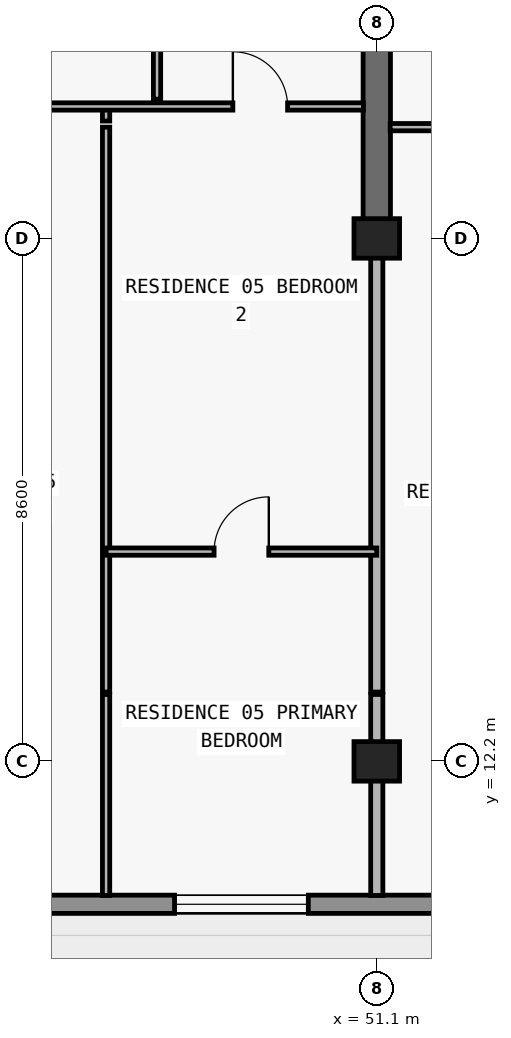
"""IFC4 building model, lengths in metres.
Left out: names, types, materials, properties, quantities, classifications, styles, units other than length and angle.
Written with IfcOpenShell. Run it as: python <this file> out.ifc"""

import sys

from ifc_helpers import new_model, si_unit, direction, frame, frame_2d, origin, origin_2d, place, context, subcontext, project, spatial, rectangle, extrude, element, fill, save


model = new_model("IFC4")
c1 = context("Model", 3, precision=1e-05, world=origin(), true_north=direction((0.0, 1.0)))
c2 = subcontext(c1, "Body", "Model", "MODEL_VIEW")
j1 = project(units=[si_unit("LENGTHUNIT", "METRE"), si_unit("PLANEANGLEUNIT", "RADIAN")], contexts=[c1])
p1 = place(None, origin())
s1 = spatial("IfcSite", under=j1, at=p1, CompositionType="ELEMENT")
p2 = place(p1, origin())
s2 = spatial("IfcBuilding", under=s1, at=p2, CompositionType="ELEMENT")
p3 = place(p2, frame((0.0, 0.0, 226.5)))
s3 = spatial("IfcBuildingStorey", under=s2, at=p3, CompositionType="ELEMENT", Elevation=226.5)
for number, where, z_axis, x_axis in (
    (1, (51.1, 12.2, 0.0), (0.0, 0.0, 1.0), (1.0, 0.0, 0.0)),
    (2, (51.1, 20.8, 0.0), (0.0, 0.0, 1.0), (1.0, 0.0, 0.0)),
):
    element("IfcColumn", number, at=place(p3, frame(where, z_axis=z_axis, x_axis=x_axis)), inside=s3, PredefinedType="COLUMN", context=c2, shape_type="SweptSolid", body=[
        extrude(rectangle(XDim=0.75, YDim=0.65, at=origin_2d()), origin(), (0.0, 0.0, 1.0), 3.05),
    ])
p4 = place(p3, frame((51.1, 20.8, 0.0), z_axis=(0.0, 0.0, 1.0), x_axis=(0.0, 1.0, 0.0)))
e3 = element("IfcWall", 3, at=p4, inside=s3, PredefinedType="SHEAR", context=c2, shape_type="SweptSolid", body=[
    extrude(rectangle(XDim=8.6, YDim=0.45, at=frame_2d((4.3, 0.0))), origin(), (0.0, 0.0, 1.0), 3.05),
])
p5 = place(p3, frame((65.7, 9.85, 0.0), z_axis=(0.0, 0.0, 1.0), x_axis=(-1.0, 0.0, 0.0)))
e4 = element("IfcWall", 4, at=p5, inside=s3, PredefinedType="STANDARD", context=c2, shape_type="SweptSolid", body=[
    extrude(rectangle(XDim=53.6, YDim=0.3, at=frame_2d((26.8, 0.0))), origin(), (0.0, 0.0, 1.0), 3.05),
])
p6 = place(p5, frame((48.05, 0.0, 0.85)))
e5 = element("IfcOpeningElement", 5, at=p6, cuts=e4, PredefinedType="OPENING", context=c2, shape_type="SweptSolid", body=[
    extrude(rectangle(XDim=1.8, YDim=1.55, at=frame_2d((0.9, 0.775))), frame((0.0, 0.16, 0.0), z_axis=(0.0, -1.0, 0.0), x_axis=(1.0, 0.0, 0.0)), (0.0, 0.0, 1.0), 0.32),
])
p7 = place(p5, frame((44.09, 0.0, 0.0)))
e6 = element("IfcOpeningElement", 6, at=p7, cuts=e4, PredefinedType="OPENING", context=c2, shape_type="SweptSolid", body=[
    extrude(rectangle(XDim=2.0, YDim=2.3, at=frame_2d((1.0, 1.15))), frame((0.0, 0.16, 0.0), z_axis=(0.0, -1.0, 0.0), x_axis=(1.0, 0.0, 0.0)), (0.0, 0.0, 1.0), 0.32),
])
p8 = place(p5, frame((39.99, 0.0, 0.85)))
e7 = element("IfcOpeningElement", 7, at=p8, cuts=e4, PredefinedType="OPENING", context=c2, shape_type="SweptSolid", body=[
    extrude(rectangle(XDim=1.8, YDim=1.55, at=frame_2d((0.9, 0.775))), frame((0.0, 0.16, 0.0), z_axis=(0.0, -1.0, 0.0), x_axis=(1.0, 0.0, 0.0)), (0.0, 0.0, 1.0), 0.32),
])
p9 = place(p5, frame((36.026, 0.0, 0.0)))
e8 = element("IfcOpeningElement", 8, at=p9, cuts=e4, PredefinedType="OPENING", context=c2, shape_type="SweptSolid", body=[
    extrude(rectangle(XDim=2.0, YDim=2.3, at=frame_2d((1.0, 1.15))), frame((0.0, 0.16, 0.0), z_axis=(0.0, -1.0, 0.0), x_axis=(1.0, 0.0, 0.0)), (0.0, 0.0, 1.0), 0.32),
])
p10 = place(p5, frame((31.726, 0.0, 0.85)))
e9 = element("IfcOpeningElement", 9, at=p10, cuts=e4, PredefinedType="OPENING", context=c2, shape_type="SweptSolid", body=[
    extrude(rectangle(XDim=2.2, YDim=1.55, at=frame_2d((1.1, 0.775))), frame((0.0, 0.16, 0.0), z_axis=(0.0, -1.0, 0.0), x_axis=(1.0, 0.0, 0.0)), (0.0, 0.0, 1.0), 0.32),
])
p11 = place(p5, frame((27.51, 0.0, 0.0)))
e10 = element("IfcOpeningElement", 10, at=p11, cuts=e4, PredefinedType="OPENING", context=c2, shape_type="SweptSolid", body=[
    extrude(rectangle(XDim=2.0, YDim=2.3, at=frame_2d((1.0, 1.15))), frame((0.0, 0.16, 0.0), z_axis=(0.0, -1.0, 0.0), x_axis=(1.0, 0.0, 0.0)), (0.0, 0.0, 1.0), 0.32),
])
p12 = place(p5, frame((23.81, 0.0, 0.85)))
e11 = element("IfcOpeningElement", 11, at=p12, cuts=e4, PredefinedType="OPENING", context=c2, shape_type="SweptSolid", body=[
    extrude(rectangle(XDim=1.8, YDim=1.55, at=frame_2d((0.9, 0.775))), frame((0.0, 0.16, 0.0), z_axis=(0.0, -1.0, 0.0), x_axis=(1.0, 0.0, 0.0)), (0.0, 0.0, 1.0), 0.32),
])
p13 = place(p5, frame((20.026, 0.0, 0.0)))
e12 = element("IfcOpeningElement", 12, at=p13, cuts=e4, PredefinedType="OPENING", context=c2, shape_type="SweptSolid", body=[
    extrude(rectangle(XDim=2.0, YDim=2.3, at=frame_2d((1.0, 1.15))), frame((0.0, 0.16, 0.0), z_axis=(0.0, -1.0, 0.0), x_axis=(1.0, 0.0, 0.0)), (0.0, 0.0, 1.0), 0.32),
])
p14 = place(p5, frame((15.726, 0.0, 0.85)))
e13 = element("IfcOpeningElement", 13, at=p14, cuts=e4, PredefinedType="OPENING", context=c2, shape_type="SweptSolid", body=[
    extrude(rectangle(XDim=2.2, YDim=1.55, at=frame_2d((1.1, 0.775))), frame((0.0, 0.16, 0.0), z_axis=(0.0, -1.0, 0.0), x_axis=(1.0, 0.0, 0.0)), (0.0, 0.0, 1.0), 0.32),
])
p15 = place(p5, frame((11.29, 0.0, 0.0)))
e14 = element("IfcOpeningElement", 14, at=p15, cuts=e4, PredefinedType="OPENING", context=c2, shape_type="SweptSolid", body=[
    extrude(rectangle(XDim=2.0, YDim=2.3, at=frame_2d((1.0, 1.15))), frame((0.0, 0.16, 0.0), z_axis=(0.0, -1.0, 0.0), x_axis=(1.0, 0.0, 0.0)), (0.0, 0.0, 1.0), 0.32),
])
p16 = place(p5, frame((7.19, 0.0, 0.85)))
e15 = element("IfcOpeningElement", 15, at=p16, cuts=e4, PredefinedType="OPENING", context=c2, shape_type="SweptSolid", body=[
    extrude(rectangle(XDim=1.8, YDim=1.55, at=frame_2d((0.9, 0.775))), frame((0.0, 0.16, 0.0), z_axis=(0.0, -1.0, 0.0), x_axis=(1.0, 0.0, 0.0)), (0.0, 0.0, 1.0), 0.32),
])
p17 = place(p5, frame((0.65, 0.0, 0.85)))
e16 = element("IfcOpeningElement", 16, at=p17, cuts=e4, PredefinedType="OPENING", context=c2, shape_type="SweptSolid", body=[
    extrude(rectangle(XDim=1.8, YDim=1.55, at=frame_2d((0.9, 0.775))), frame((0.0, 0.16, 0.0), z_axis=(0.0, -1.0, 0.0), x_axis=(1.0, 0.0, 0.0)), (0.0, 0.0, 1.0), 0.32),
])
p18 = place(p3, frame((46.648, 9.995, 0.0), z_axis=(0.0, 0.0, 1.0), x_axis=(0.0, 1.0, 0.0)))
e17 = element("IfcWall", 17, at=p18, inside=s3, PredefinedType="PARTITIONING", context=c2, shape_type="SweptSolid", body=[
    extrude(rectangle(XDim=3.305, YDim=0.12, at=frame_2d((1.652, 0.0))), origin(), (0.0, 0.0, 1.0), 3.05),
])
p19 = place(p3, frame((46.648, 13.34, 0.0), z_axis=(0.0, 0.0, 1.0), x_axis=(0.0, 1.0, 0.0)))
e18 = element("IfcWall", 18, at=p19, inside=s3, PredefinedType="PARTITIONING", context=c2, shape_type="SweptSolid", body=[
    extrude(rectangle(XDim=9.29, YDim=0.12, at=frame_2d((4.645, 0.0))), origin(), (0.0, 0.0, 1.0), 3.05),
])
p20 = place(p3, frame((46.648, 22.73, 0.0), z_axis=(0.0, 0.0, 1.0), x_axis=(0.0, 1.0, 0.0)))
e19 = element("IfcWall", 19, at=p20, inside=s3, PredefinedType="PARTITIONING", context=c2, shape_type="SweptSolid", body=[
    extrude(rectangle(XDim=0.24, YDim=0.12, at=frame_2d((0.12, 0.0))), origin(), (0.0, 0.0, 1.0), 3.05),
])
p21 = place(p3, frame((47.486, 23.09, 0.0), z_axis=(0.0, 0.0, 1.0), x_axis=(0.0, 1.0, 0.0)))
e20 = element("IfcWall", 20, at=p21, inside=s3, PredefinedType="PARTITIONING", context=c2, shape_type="SweptSolid", body=[
    extrude(rectangle(XDim=4.69, YDim=0.12, at=frame_2d((2.345, 0.0))), origin(), (0.0, 0.0, 1.0), 3.05),
])
p22 = place(p21, frame((1.895, 0.0, 0.0)))
e21 = element("IfcOpeningElement", 21, at=p22, cuts=e20, PredefinedType="OPENING", context=c2, shape_type="SweptSolid", body=[
    extrude(rectangle(XDim=0.9, YDim=2.15, at=frame_2d((0.45, 1.075))), frame((0.0, 0.07, 0.0), z_axis=(0.0, -1.0, 0.0), x_axis=(1.0, 0.0, 0.0)), (0.0, 0.0, 1.0), 0.14),
])
p23 = place(p3, frame((51.1, 9.995, 0.0), z_axis=(0.0, 0.0, 1.0), x_axis=(0.0, 1.0, 0.0)))
e22 = element("IfcWall", 22, at=p23, inside=s3, PredefinedType="PARTITIONING", context=c2, shape_type="SweptSolid", body=[
    extrude(rectangle(XDim=3.305, YDim=0.2, at=frame_2d((1.652, 0.0))), origin(), (0.0, 0.0, 1.0), 2.263),
])
p24 = place(p3, frame((51.1, 13.34, 0.0), z_axis=(0.0, 0.0, 1.0), x_axis=(0.0, 1.0, 0.0)))
e23 = element("IfcWall", 23, at=p24, inside=s3, PredefinedType="PARTITIONING", context=c2, shape_type="SweptSolid", body=[
    extrude(rectangle(XDim=7.455, YDim=0.2, at=frame_2d((3.728, 0.0))), origin(), (0.0, 0.0, 1.0), 2.263),
])
p25 = place(p3, frame((46.648, 15.65, 0.0), z_axis=(0.0, 0.0, 1.0), x_axis=(1.0, 0.0, 0.0)))
e24 = element("IfcWall", 24, at=p25, inside=s3, PredefinedType="PARTITIONING", context=c2, shape_type="SweptSolid", body=[
    extrude(rectangle(XDim=4.452, YDim=0.12, at=frame_2d((2.226, 0.0))), origin(), (0.0, 0.0, 1.0), 3.05),
])
p26 = place(p25, frame((1.776, 0.0, 0.0)))
e25 = element("IfcOpeningElement", 25, at=p26, cuts=e24, PredefinedType="OPENING", context=c2, shape_type="SweptSolid", body=[
    extrude(rectangle(XDim=0.9, YDim=2.15, at=frame_2d((0.45, 1.075))), frame((0.0, 0.07, 0.0), z_axis=(0.0, -1.0, 0.0), x_axis=(1.0, 0.0, 0.0)), (0.0, 0.0, 1.0), 0.14),
])
p27 = place(p3, frame((51.32, 22.63, 0.0), z_axis=(0.0, 0.0, 1.0), x_axis=(1.0, 0.0, 0.0)))
e26 = element("IfcWall", 26, at=p27, inside=s3, PredefinedType="PARTITIONING", context=c2, shape_type="SweptSolid", body=[
    extrude(rectangle(XDim=8.18, YDim=0.12, at=frame_2d((4.09, 0.0))), origin(), (0.0, 0.0, 1.0), 3.05),
])
p28 = place(p27, frame((1.583, 0.0, 0.0)))
e27 = element("IfcOpeningElement", 27, at=p28, cuts=e26, PredefinedType="OPENING", context=c2, shape_type="SweptSolid", body=[
    extrude(rectangle(XDim=0.9, YDim=2.15, at=frame_2d((0.45, 1.075))), frame((0.0, 0.07, 0.0), z_axis=(0.0, -1.0, 0.0), x_axis=(1.0, 0.0, 0.0)), (0.0, 0.0, 1.0), 0.14),
])
p29 = place(p27, frame((5.84, 0.0, 0.0)))
e28 = element("IfcOpeningElement", 28, at=p29, cuts=e26, PredefinedType="OPENING", context=c2, shape_type="SweptSolid", body=[
    extrude(rectangle(XDim=0.9, YDim=2.15, at=frame_2d((0.45, 1.075))), frame((0.0, 0.07, 0.0), z_axis=(0.0, -1.0, 0.0), x_axis=(1.0, 0.0, 0.0)), (0.0, 0.0, 1.0), 0.14),
])
p30 = place(p3, frame((42.7, 22.97, 0.0), z_axis=(0.0, 0.0, 1.0), x_axis=(1.0, 0.0, 0.0)))
e29 = element("IfcWall", 29, at=p30, inside=s3, PredefinedType="PARTITIONING", context=c2, shape_type="SweptSolid", body=[
    extrude(rectangle(XDim=8.18, YDim=0.12, at=frame_2d((4.09, 0.0))), origin(), (0.0, 0.0, 1.0), 3.05),
])
p31 = place(p30, frame((1.524, 0.0, 0.0)))
e30 = element("IfcOpeningElement", 30, at=p31, cuts=e29, PredefinedType="OPENING", context=c2, shape_type="SweptSolid", body=[
    extrude(rectangle(XDim=0.9, YDim=2.15, at=frame_2d((0.45, 1.075))), frame((0.0, 0.07, 0.0), z_axis=(0.0, -1.0, 0.0), x_axis=(1.0, 0.0, 0.0)), (0.0, 0.0, 1.0), 0.14),
])
p32 = place(p30, frame((6.033, 0.0, 0.0)))
e31 = element("IfcOpeningElement", 31, at=p32, cuts=e29, PredefinedType="OPENING", context=c2, shape_type="SweptSolid", body=[
    extrude(rectangle(XDim=0.9, YDim=2.15, at=frame_2d((0.45, 1.075))), frame((0.0, 0.07, 0.0), z_axis=(0.0, -1.0, 0.0), x_axis=(1.0, 0.0, 0.0)), (0.0, 0.0, 1.0), 0.14),
])
p33 = place(p14, origin())
e32 = element("IfcWindow", 32, at=p33, inside=s3, PartitioningType="SINGLE_PANEL", PredefinedType="WINDOW", context=c2, shape_type="SweptSolid", body=[
    extrude(rectangle(XDim=2.2, YDim=1.55, at=frame_2d((1.1, 0.775))), frame((0.0, 0.03, 0.0), z_axis=(0.0, -1.0, 0.0), x_axis=(1.0, 0.0, 0.0)), (0.0, 0.0, 1.0), 0.06),
])
fill(e13, e32)
p34 = place(p32, origin())
e33 = element("IfcDoor", 33, at=p34, inside=s3, OperationType="SINGLE_SWING_LEFT", PredefinedType="DOOR", context=c2, shape_type="SweptSolid", body=[
    extrude(rectangle(XDim=0.9, YDim=2.15, at=frame_2d((0.45, 1.075))), frame((0.0, 0.025, 0.0), z_axis=(0.0, -1.0, 0.0), x_axis=(1.0, 0.0, 0.0)), (0.0, 0.0, 1.0), 0.05),
])
fill(e31, e33)
p35 = place(p26, origin())
e34 = element("IfcDoor", 34, at=p35, inside=s3, OperationType="SINGLE_SWING_RIGHT", PredefinedType="DOOR", context=c2, shape_type="SweptSolid", body=[
    extrude(rectangle(XDim=0.9, YDim=2.15, at=frame_2d((0.45, 1.075))), frame((0.0, 0.025, 0.0), z_axis=(0.0, -1.0, 0.0), x_axis=(1.0, 0.0, 0.0)), (0.0, 0.0, 1.0), 0.05),
])
fill(e25, e34)
save(model, sys.argv[1])
